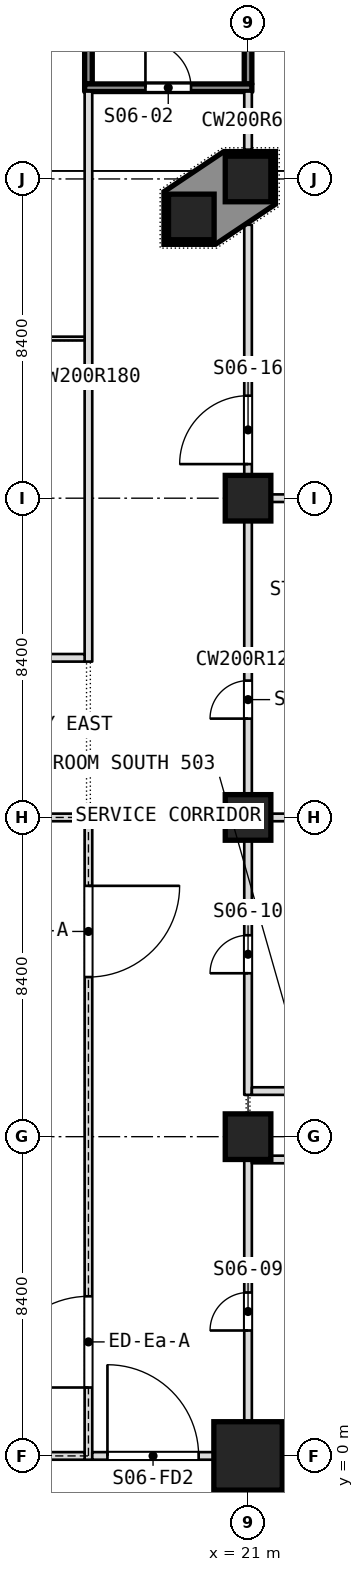
"""IFC4 building model, lengths in metres.
Left out: names, types, materials, properties, quantities, classifications, styles, units other than length and angle.
Written with IfcOpenShell. Run it as: python <this file> out.ifc"""

import sys

from ifc_helpers import new_model, si_unit, direction, frame, frame_2d, origin, origin_2d, place, context, subcontext, project, spatial, polyline, rectangle, outline, extrude, element, fill, save


model = new_model("IFC4")
c1 = context("Model", 3, precision=1e-05, world=origin(), true_north=direction((0.0, 1.0)))
c2 = subcontext(c1, "Body", "Model", "MODEL_VIEW")
j1 = project(units=[si_unit("LENGTHUNIT", "METRE"), si_unit("PLANEANGLEUNIT", "RADIAN")], contexts=[c1])
p1 = place(None, origin())
s1 = spatial("IfcSite", under=j1, at=p1, CompositionType="ELEMENT")
p2 = place(p1, origin())
s2 = spatial("IfcBuilding", under=s1, at=p2, CompositionType="ELEMENT")
p3 = place(p2, frame((0.0, 0.0, 31.0)))
s3 = spatial("IfcBuildingStorey", under=s2, at=p3, CompositionType="ELEMENT", Elevation=31.0)
p4 = place(p3, frame((21.0, 0.0, 0.0), z_axis=(0.0, 0.0, 1.0), x_axis=(1.0, 0.0, 0.0)))
e1 = element("IfcColumn", 1, at=p4, inside=s3, PredefinedType="COLUMN", context=c2, shape_type="SweptSolid", body=[
    extrude(rectangle(XDim=1.8, YDim=1.8, at=origin_2d()), origin(), (0.0, 0.0, 1.0), 5.5),
])
for number, where, z_axis, x_axis in (
    (2, (21.0, 8.4, 0.0), (0.0, 0.0, 1.0), (1.0, 0.0, 0.0)),
    (3, (21.0, 16.8, 0.0), (0.0, 0.0, 1.0), (1.0, 0.0, 0.0)),
    (4, (21.0, 25.2, 0.0), (0.0, 0.0, 1.0), (1.0, 0.0, 0.0)),
    (5, (21.0, 33.6, 0.0), (0.0, 0.0, 1.0), (1.0, 0.0, 0.0)),
    (6, (19.507, 32.6, 0.0), (0.0, 0.0, 1.0), (1.0, 0.0, 0.0)),
):
    element("IfcColumn", number, at=place(p3, frame(where, z_axis=z_axis, x_axis=x_axis)), inside=s3, PredefinedType="COLUMN", context=c2, shape_type="SweptSolid", body=[
        extrude(rectangle(XDim=1.2, YDim=1.2, at=origin_2d()), origin(), (0.0, 0.0, 1.0), 5.5),
    ])
p5 = place(p3, frame((21.0, -0.3, 0.0), z_axis=(0.0, 0.0, 1.0), x_axis=(0.0, 1.0, 0.0)))
e7 = element("IfcWall", 7, at=p5, inside=s3, PredefinedType="PARTITIONING", context=c2, shape_type="SweptSolid", body=[
    extrude(rectangle(XDim=8.2, YDim=0.2, at=frame_2d((4.1, 0.0))), origin(), (0.0, 0.0, 1.0), 4.95),
])
p6 = place(p5, frame((3.6, 0.0, 0.0)))
e8 = element("IfcOpeningElement", 8, at=p6, cuts=e7, PredefinedType="OPENING", context=c2, shape_type="SweptSolid", body=[
    extrude(rectangle(XDim=1.0, YDim=2.1, at=frame_2d((0.5, 1.05))), frame((0.0, 0.1, 0.0), z_axis=(0.0, -1.0, 0.0), x_axis=(1.0, 0.0, 0.0)), (0.0, 0.0, 1.0), 0.2),
])
p7 = place(p3, frame((21.0, 9.5, 0.0), z_axis=(0.0, 0.0, 1.0), x_axis=(0.0, 1.0, 0.0)))
e9 = element("IfcWall", 9, at=p7, inside=s3, PredefinedType="PARTITIONING", context=c2, shape_type="SweptSolid", body=[
    extrude(rectangle(XDim=22.894, YDim=0.2, at=frame_2d((11.447, 0.0))), origin(), (0.0, 0.0, 1.0), 4.95),
])
p8 = place(p7, frame((3.2, 0.0, 0.0)))
e10 = element("IfcOpeningElement", 10, at=p8, cuts=e9, PredefinedType="OPENING", context=c2, shape_type="SweptSolid", body=[
    extrude(rectangle(XDim=1.0, YDim=2.1, at=frame_2d((0.5, 1.05))), frame((0.0, 0.1, 0.0), z_axis=(0.0, -1.0, 0.0), x_axis=(1.0, 0.0, 0.0)), (0.0, 0.0, 1.0), 0.2),
])
p9 = place(p7, frame((9.9, 0.0, 0.0)))
e11 = element("IfcOpeningElement", 11, at=p9, cuts=e9, PredefinedType="OPENING", context=c2, shape_type="SweptSolid", body=[
    extrude(rectangle(XDim=1.0, YDim=2.1, at=frame_2d((0.5, 1.05))), frame((0.0, 0.1, 0.0), z_axis=(0.0, -1.0, 0.0), x_axis=(1.0, 0.0, 0.0)), (0.0, 0.0, 1.0), 0.2),
])
p10 = place(p7, frame((16.597, 0.0, 0.0)))
e12 = element("IfcOpeningElement", 12, at=p10, cuts=e9, PredefinedType="OPENING", context=c2, shape_type="SweptSolid", body=[
    extrude(rectangle(XDim=1.8, YDim=2.1, at=frame_2d((0.9, 1.05))), frame((0.0, 0.1, 0.0), z_axis=(0.0, -1.0, 0.0), x_axis=(1.0, 0.0, 0.0)), (0.0, 0.0, 1.0), 0.2),
])
p11 = place(p3, frame((21.0, 34.37, 0.0), z_axis=(0.0, 0.0, 1.0), x_axis=(0.0, 1.0, 0.0)))
e13 = element("IfcWall", 13, at=p11, inside=s3, PredefinedType="PARTITIONING", context=c2, shape_type="SweptSolid", body=[
    extrude(rectangle(XDim=1.53, YDim=0.2, at=frame_2d((0.765, 0.0))), origin(), (0.0, 0.0, 1.0), 5.35),
])
p12 = place(p3, frame((21.0, 36.1, 0.0), z_axis=(0.0, 0.0, 1.0), x_axis=(0.0, 1.0, 0.0)))
e14 = element("IfcWall", 14, at=p12, inside=s3, PredefinedType="PARTITIONING", context=c2, shape_type="SweptSolid", body=[
    extrude(rectangle(XDim=6.2, YDim=0.2, at=frame_2d((3.1, 0.0))), origin(), (0.0, 0.0, 1.0), 5.35),
])
p13 = place(p3, frame((16.8, 20.9, 0.0), z_axis=(0.0, 0.0, 1.0), x_axis=(0.0, 1.0, 0.0)))
e15 = element("IfcWall", 15, at=p13, inside=s3, PredefinedType="PARTITIONING", context=c2, shape_type="SweptSolid", body=[
    extrude(rectangle(XDim=15.0, YDim=0.2, at=frame_2d((7.5, 0.0))), origin(), (0.0, 0.0, 1.0), 4.95),
])
p14 = place(p3, frame((16.8, 36.1, 0.0), z_axis=(0.0, 0.0, 1.0), x_axis=(0.0, 1.0, 0.0)))
e16 = element("IfcWall", 16, at=p14, inside=s3, PredefinedType="PARTITIONING", context=c2, shape_type="SweptSolid", body=[
    extrude(rectangle(XDim=5.84, YDim=0.2, at=frame_2d((2.92, 0.0))), origin(), (0.0, 0.0, 1.0), 5.35),
])
p15 = place(p3, frame((21.1, 7.8, 0.0), z_axis=(0.0, 0.0, 1.0), x_axis=(1.0, 0.0, 0.0)))
e17 = element("IfcWall", 17, at=p15, inside=s3, PredefinedType="PARTITIONING", context=c2, shape_type="SweptSolid", body=[
    extrude(rectangle(XDim=16.64, YDim=0.2, at=frame_2d((8.32, 0.0))), origin(), (0.0, 0.0, 1.0), 5.35),
])
p16 = place(p3, frame((21.1, 9.6, 0.0), z_axis=(0.0, 0.0, 1.0), x_axis=(1.0, 0.0, 0.0)))
e18 = element("IfcWall", 18, at=p16, inside=s3, PredefinedType="PARTITIONING", context=c2, shape_type="SweptSolid", body=[
    extrude(rectangle(XDim=16.64, YDim=0.2, at=frame_2d((8.32, 0.0))), origin(), (0.0, 0.0, 1.0), 5.35),
])
p17 = place(p16, frame((14.0, 0.0, 0.0)))
e19 = element("IfcOpeningElement", 19, at=p17, cuts=e18, PredefinedType="OPENING", context=c2, shape_type="SweptSolid", body=[
    extrude(rectangle(XDim=1.2, YDim=2.1, at=frame_2d((0.6, 1.05))), frame((0.0, 0.1, 0.0), z_axis=(0.0, -1.0, 0.0), x_axis=(1.0, 0.0, 0.0)), (0.0, 0.0, 1.0), 0.2),
])
p18 = place(p3, frame((21.1, 16.8, 0.0), z_axis=(0.0, 0.0, 1.0), x_axis=(1.0, 0.0, 0.0)))
e20 = element("IfcWall", 20, at=p18, inside=s3, PredefinedType="PARTITIONING", context=c2, shape_type="SweptSolid", body=[
    extrude(rectangle(XDim=6.53, YDim=0.2, at=frame_2d((3.265, 0.0))), origin(), (0.0, 0.0, 1.0), 4.85),
])
p19 = place(p3, frame((4.1, 21.0, 0.0), z_axis=(0.0, 0.0, 1.0), x_axis=(1.0, 0.0, 0.0)))
e21 = element("IfcWall", 21, at=p19, inside=s3, PredefinedType="PARTITIONING", context=c2, shape_type="SweptSolid", body=[
    extrude(rectangle(XDim=12.6, YDim=0.2, at=frame_2d((6.3, 0.0))), origin(), (0.0, 0.0, 1.0), 5.35),
])
p20 = place(p19, frame((5.4, 0.0, 0.0)))
e22 = element("IfcOpeningElement", 22, at=p20, cuts=e21, PredefinedType="OPENING", context=c2, shape_type="SweptSolid", body=[
    extrude(rectangle(XDim=1.8, YDim=2.1, at=frame_2d((0.9, 1.05))), frame((0.0, 0.1, 0.0), z_axis=(0.0, -1.0, 0.0), x_axis=(1.0, 0.0, 0.0)), (0.0, 0.0, 1.0), 0.2),
])
p21 = place(p3, frame((21.1, 25.2, 0.0), z_axis=(0.0, 0.0, 1.0), x_axis=(1.0, 0.0, 0.0)))
e23 = element("IfcWall", 23, at=p21, inside=s3, PredefinedType="PARTITIONING", context=c2, shape_type="SweptSolid", body=[
    extrude(rectangle(XDim=6.765, YDim=0.2, at=frame_2d((3.382, 0.0))), origin(), (0.0, 0.0, 1.0), 4.85),
])
p22 = place(p3, frame((4.3, 29.4, 0.0), z_axis=(0.0, 0.0, 1.0), x_axis=(1.0, 0.0, 0.0)))
e24 = element("IfcWall", 24, at=p22, inside=s3, PredefinedType="PARTITIONING", context=c2, shape_type="SweptSolid", body=[
    extrude(rectangle(XDim=12.4, YDim=0.1, at=frame_2d((6.2, 0.0))), origin(), (0.0, 0.0, 1.0), 5.35),
])
p23 = place(p22, frame((5.7, 0.0, 0.0)))
e25 = element("IfcOpeningElement", 25, at=p23, cuts=e24, PredefinedType="OPENING", context=c2, shape_type="SweptSolid", body=[
    extrude(rectangle(XDim=1.0, YDim=2.1, at=frame_2d((0.5, 1.05))), frame((0.0, 0.05, 0.0), z_axis=(0.0, -1.0, 0.0), x_axis=(1.0, 0.0, 0.0)), (0.0, 0.0, 1.0), 0.1),
])
p24 = place(p3, frame((16.7, 36.0, 0.0), z_axis=(0.0, 0.0, 1.0), x_axis=(1.0, 0.0, 0.0)))
e26 = element("IfcWall", 26, at=p24, inside=s3, PredefinedType="PARTITIONING", context=c2, shape_type="SweptSolid", body=[
    extrude(rectangle(XDim=4.4, YDim=0.2, at=frame_2d((2.2, 0.0))), origin(), (0.0, 0.0, 1.0), 5.35),
])
p25 = place(p24, frame((1.6, 0.0, 0.0)))
e27 = element("IfcOpeningElement", 27, at=p25, cuts=e26, PredefinedType="OPENING", context=c2, shape_type="SweptSolid", body=[
    extrude(rectangle(XDim=1.2, YDim=2.1, at=frame_2d((0.6, 1.05))), frame((0.0, 0.1, 0.0), z_axis=(0.0, -1.0, 0.0), x_axis=(1.0, 0.0, 0.0)), (0.0, 0.0, 1.0), 0.2),
])
p26 = place(p3, frame((16.8, -0.1, 0.0), z_axis=(0.0, 0.0, 1.0), x_axis=(0.0, 1.0, 0.0)))
e28 = element("IfcWall", 28, at=p26, inside=s3, PredefinedType="PARTITIONING", context=c2, shape_type="SweptSolid", body=[
    extrude(rectangle(XDim=17.0, YDim=0.2, at=frame_2d((8.5, 0.0))), origin(), (0.0, 0.0, 1.0), 4.95),
])
p27 = place(p26, frame((1.9, 0.0, 0.0)))
e29 = element("IfcOpeningElement", 29, at=p27, cuts=e28, PredefinedType="OPENING", context=c2, shape_type="SweptSolid", body=[
    extrude(rectangle(XDim=2.4, YDim=2.1, at=frame_2d((1.2, 1.05))), frame((0.0, 0.1, 0.0), z_axis=(0.0, -1.0, 0.0), x_axis=(1.0, 0.0, 0.0)), (0.0, 0.0, 1.0), 0.2),
])
p28 = place(p26, frame((12.7, 0.0, 0.0)))
e30 = element("IfcOpeningElement", 30, at=p28, cuts=e28, PredefinedType="OPENING", context=c2, shape_type="SweptSolid", body=[
    extrude(rectangle(XDim=2.4, YDim=2.1, at=frame_2d((1.2, 1.05))), frame((0.0, 0.1, 0.0), z_axis=(0.0, -1.0, 0.0), x_axis=(1.0, 0.0, 0.0)), (0.0, 0.0, 1.0), 0.2),
])
for number, where, z_axis, x_axis in (
    (31, (12.6, 0.0, 0.0), (0.0, 0.0, 1.0), (1.0, 0.0, 0.0)),
    (32, (12.6, 16.8, 0.0), (0.0, 0.0, 1.0), (1.0, 0.0, 0.0)),
):
    element("IfcWall", number, at=place(p3, frame(where, z_axis=z_axis, x_axis=x_axis)), inside=s3, PredefinedType="PARTITIONING", context=c2, shape_type="SweptSolid", body=[
        extrude(rectangle(XDim=4.1, YDim=0.2, at=frame_2d((2.05, 0.0))), origin(), (0.0, 0.0, 1.0), 4.85),
    ])
p29 = place(p3, origin())
e33 = element("IfcWall", 33, at=p29, inside=s3, PredefinedType="SOLIDWALL", context=c2, shape_type="SweptSolid", body=[
    extrude(outline(polyline([(20.364, 34.32), (21.72, 34.32), (21.72, 32.936), (20.143, 31.88), (18.787, 31.88), (18.787, 33.264), (20.364, 34.32)]), holes=[polyline([(21.6, 33.0), (21.6, 34.2), (20.4, 34.2), (20.4, 33.0), (21.6, 33.0)]), polyline([(20.107, 32.0), (20.107, 33.2), (18.907, 33.2), (18.907, 32.0), (20.107, 32.0)])]), origin(), (0.0, 0.0, 1.0), 5.5),
])
p30 = place(p3, frame((16.901, 0.0, 0.0), z_axis=(0.0, 0.0, 1.0), x_axis=(1.0, 0.0, 0.0)))
e34 = element("IfcWall", 34, at=p30, inside=s3, PredefinedType="PARTITIONING", context=c2, shape_type="SweptSolid", body=[
    extrude(rectangle(XDim=3.198, YDim=0.2, at=frame_2d((1.599, 0.0))), origin(), (0.0, 0.0, 1.0), 4.85),
])
p31 = place(p30, frame((0.399, 0.0, 0.0)))
e35 = element("IfcOpeningElement", 35, at=p31, cuts=e34, PredefinedType="OPENING", context=c2, shape_type="SweptSolid", body=[
    extrude(rectangle(XDim=2.4, YDim=2.1, at=frame_2d((1.2, 1.05))), frame((0.0, 0.1, 0.0), z_axis=(0.0, -1.0, 0.0), x_axis=(1.0, 0.0, 0.0)), (0.0, 0.0, 1.0), 0.2),
])
p32 = place(p3, frame((21.901, 0.0, 0.0), z_axis=(0.0, 0.0, 1.0), x_axis=(1.0, 0.0, 0.0)))
e36 = element("IfcWall", 36, at=p32, inside=s3, PredefinedType="PARTITIONING", context=c2, shape_type="SweptSolid", body=[
    extrude(rectangle(XDim=4.561, YDim=0.2, at=frame_2d((2.281, 0.0))), origin(), (0.0, 0.0, 1.0), 4.85),
])
p33 = place(p25, origin())
e37 = element("IfcDoor", 37, at=p33, inside=s3, OperationType="SINGLE_SWING_LEFT", PredefinedType="DOOR", context=c2, shape_type="SweptSolid", body=[
    extrude(rectangle(XDim=1.2, YDim=2.1, at=frame_2d((0.6, 1.05))), frame((0.0, 0.025, 0.0), z_axis=(0.0, -1.0, 0.0), x_axis=(1.0, 0.0, 0.0)), (0.0, 0.0, 1.0), 0.05),
])
fill(e27, e37)
p34 = place(p6, origin())
e38 = element("IfcDoor", 38, at=p34, inside=s3, OperationType="SINGLE_SWING_RIGHT", PredefinedType="DOOR", context=c2, shape_type="SweptSolid", body=[
    extrude(rectangle(XDim=1.0, YDim=2.1, at=frame_2d((0.5, 1.05))), frame((0.0, 0.025, 0.0), z_axis=(0.0, -1.0, 0.0), x_axis=(1.0, 0.0, 0.0)), (0.0, 0.0, 1.0), 0.05),
])
fill(e8, e38)
p35 = place(p8, origin())
e39 = element("IfcDoor", 39, at=p35, inside=s3, OperationType="SINGLE_SWING_LEFT", PredefinedType="DOOR", context=c2, shape_type="SweptSolid", body=[
    extrude(rectangle(XDim=1.0, YDim=2.1, at=frame_2d((0.5, 1.05))), frame((0.0, 0.025, 0.0), z_axis=(0.0, -1.0, 0.0), x_axis=(1.0, 0.0, 0.0)), (0.0, 0.0, 1.0), 0.05),
])
fill(e10, e39)
p36 = place(p9, origin())
e40 = element("IfcDoor", 40, at=p36, inside=s3, OperationType="SINGLE_SWING_RIGHT", PredefinedType="DOOR", context=c2, shape_type="SweptSolid", body=[
    extrude(rectangle(XDim=1.0, YDim=2.1, at=frame_2d((0.5, 1.05))), frame((0.0, 0.025, 0.0), z_axis=(0.0, -1.0, 0.0), x_axis=(1.0, 0.0, 0.0)), (0.0, 0.0, 1.0), 0.05),
])
fill(e11, e40)
p37 = place(p10, origin())
e41 = element("IfcDoor", 41, at=p37, inside=s3, OperationType="DOUBLE_DOOR_SINGLE_SWING", PredefinedType="DOOR", context=c2, shape_type="SweptSolid", body=[
    extrude(rectangle(XDim=1.8, YDim=2.1, at=frame_2d((0.9, 1.05))), frame((0.0, 0.025, 0.0), z_axis=(0.0, -1.0, 0.0), x_axis=(1.0, 0.0, 0.0)), (0.0, 0.0, 1.0), 0.05),
])
fill(e12, e41)
p38 = place(p27, origin())
e42 = element("IfcDoor", 42, at=p38, inside=s3, OperationType="DOUBLE_DOOR_SINGLE_SWING", PredefinedType="DOOR", context=c2, shape_type="SweptSolid", body=[
    extrude(rectangle(XDim=2.4, YDim=2.1, at=frame_2d((1.2, 1.05))), frame((0.0, 0.025, 0.0), z_axis=(0.0, -1.0, 0.0), x_axis=(1.0, 0.0, 0.0)), (0.0, 0.0, 1.0), 0.05),
])
fill(e29, e42)
p39 = place(p28, origin())
e43 = element("IfcDoor", 43, at=p39, inside=s3, OperationType="DOUBLE_DOOR_SINGLE_SWING", PredefinedType="DOOR", context=c2, shape_type="SweptSolid", body=[
    extrude(rectangle(XDim=2.4, YDim=2.1, at=frame_2d((1.2, 1.05))), frame((0.0, 0.025, 0.0), z_axis=(0.0, -1.0, 0.0), x_axis=(1.0, 0.0, 0.0)), (0.0, 0.0, 1.0), 0.05),
])
fill(e30, e43)
p40 = place(p31, origin())
e44 = element("IfcDoor", 44, at=p40, inside=s3, OperationType="DOUBLE_DOOR_DOUBLE_SWING", PredefinedType="DOOR", context=c2, shape_type="SweptSolid", body=[
    extrude(rectangle(XDim=2.4, YDim=2.1, at=frame_2d((1.2, 1.05))), frame((0.0, 0.025, 0.0), z_axis=(0.0, -1.0, 0.0), x_axis=(1.0, 0.0, 0.0)), (0.0, 0.0, 1.0), 0.05),
])
fill(e35, e44)
save(model, sys.argv[1])
